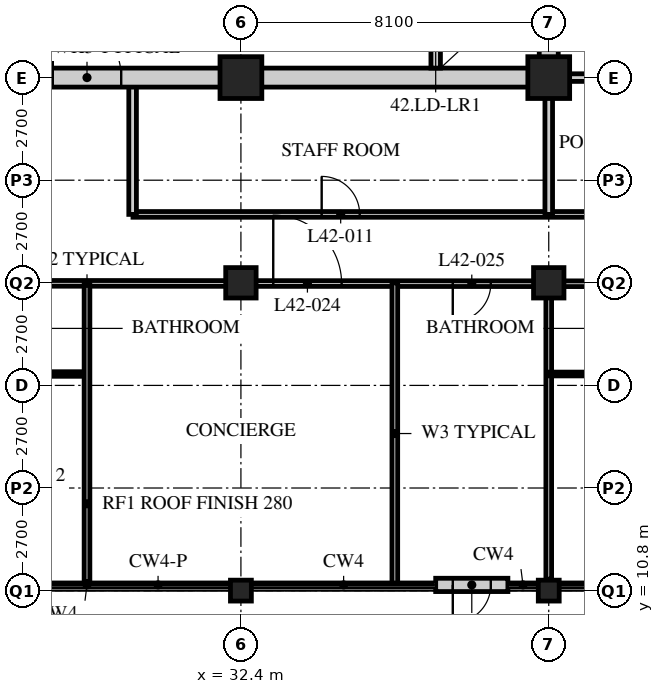
"""IFC4 building model, lengths in metres.
Left out: names, types, materials, properties, quantities, classifications, styles, units other than length and angle.
Written with IfcOpenShell. Run it as: python <this file> out.ifc"""

import sys

from ifc_helpers import new_model, si_unit, direction, frame, frame_2d, origin, origin_2d, place, context, subcontext, project, spatial, rectangle, hollow_rectangle, extrude, element, fill, save


model = new_model("IFC4")
c1 = context("Model", 3, precision=1e-05, world=origin(), true_north=direction((0.0, 1.0)))
c2 = subcontext(c1, "Body", "Model", "MODEL_VIEW")
j1 = project(units=[si_unit("LENGTHUNIT", "METRE"), si_unit("PLANEANGLEUNIT", "RADIAN")], contexts=[c1])
p1 = place(None, origin())
s1 = spatial("IfcSite", under=j1, at=p1, CompositionType="ELEMENT")
p2 = place(p1, origin())
s2 = spatial("IfcBuilding", under=s1, at=p2, CompositionType="ELEMENT")
p3 = place(p2, frame((0.0, 0.0, 165.0)))
s3 = spatial("IfcBuildingStorey", under=s2, at=p3, CompositionType="ELEMENT", Elevation=165.0)
p4 = place(p3, frame((32.4, 10.8, 0.0), z_axis=(0.0, 0.0, 1.0), x_axis=(1.0, 0.0, 0.0)))
e1 = element("IfcColumn", 1, at=p4, inside=s3, PredefinedType="COLUMN", context=c2, shape_type="SweptSolid", body=[
    extrude(hollow_rectangle(XDim=0.55, YDim=0.55, WallThickness=0.04, at=origin_2d()), origin(), (0.0, 0.0, 1.0), 5.4),
])
p5 = place(p3, frame((32.4, 18.9, 0.0), z_axis=(0.0, 0.0, 1.0), x_axis=(1.0, 0.0, 0.0)))
e2 = element("IfcColumn", 2, at=p5, inside=s3, PredefinedType="COLUMN", context=c2, shape_type="SweptSolid", body=[
    extrude(hollow_rectangle(XDim=0.8, YDim=0.8, WallThickness=0.08, at=origin_2d()), origin(), (0.0, 0.0, 1.0), 5.4),
])
p6 = place(p3, frame((32.4, 24.3, 0.0), z_axis=(0.0, 0.0, 1.0), x_axis=(1.0, 0.0, 0.0)))
e3 = element("IfcColumn", 3, at=p6, inside=s3, PredefinedType="COLUMN", context=c2, shape_type="SweptSolid", body=[
    extrude(hollow_rectangle(XDim=1.1, YDim=1.1, WallThickness=0.1, at=origin_2d()), origin(), (0.0, 0.0, 1.0), 5.4),
])
p7 = place(p3, frame((40.5, 10.8, 0.0), z_axis=(0.0, 0.0, 1.0), x_axis=(1.0, 0.0, 0.0)))
e4 = element("IfcColumn", 4, at=p7, inside=s3, PredefinedType="COLUMN", context=c2, shape_type="SweptSolid", body=[
    extrude(hollow_rectangle(XDim=0.55, YDim=0.55, WallThickness=0.04, at=origin_2d()), origin(), (0.0, 0.0, 1.0), 5.4),
])
p8 = place(p3, frame((40.5, 18.9, 0.0), z_axis=(0.0, 0.0, 1.0), x_axis=(1.0, 0.0, 0.0)))
e5 = element("IfcColumn", 5, at=p8, inside=s3, PredefinedType="COLUMN", context=c2, shape_type="SweptSolid", body=[
    extrude(hollow_rectangle(XDim=0.8, YDim=0.8, WallThickness=0.08, at=origin_2d()), origin(), (0.0, 0.0, 1.0), 5.4),
])
p9 = place(p3, frame((40.5, 24.3, 0.0), z_axis=(0.0, 0.0, 1.0), x_axis=(1.0, 0.0, 0.0)))
e6 = element("IfcColumn", 6, at=p9, inside=s3, PredefinedType="COLUMN", context=c2, shape_type="SweptSolid", body=[
    extrude(hollow_rectangle(XDim=1.1, YDim=1.1, WallThickness=0.1, at=origin_2d()), origin(), (0.0, 0.0, 1.0), 5.4),
])
p10 = place(p3, frame((37.525, 10.95, 0.0), z_axis=(0.0, 0.0, 1.0), x_axis=(1.0, 0.0, 0.0)))
e7 = element("IfcWall", 7, at=p10, inside=s3, PredefinedType="SOLIDWALL", context=c2, shape_type="SweptSolid", body=[
    extrude(rectangle(XDim=1.9, YDim=0.35, at=frame_2d((0.95, 0.0))), origin(), (0.0, 0.0, 1.0), 4.42),
])
p11 = place(p10, frame((0.45, 0.0, 0.0)))
e8 = element("IfcOpeningElement", 8, at=p11, cuts=e7, PredefinedType="OPENING", context=c2, shape_type="SweptSolid", body=[
    extrude(rectangle(XDim=1.0, YDim=2.1, at=frame_2d((0.5, 1.05))), frame((0.0, 0.185, 0.0), z_axis=(0.0, -1.0, 0.0), x_axis=(1.0, 0.0, 0.0)), (0.0, 0.0, 1.0), 0.37),
])
p12 = place(p3, frame((8.1, 18.9, 0.0), z_axis=(0.0, 0.0, 1.0), x_axis=(0.999999729567, -0.000735435758, 0.0)))
e9 = element("IfcWall", 9, at=p12, inside=s3, PredefinedType="PARTITIONING", context=c2, shape_type="SweptSolid", body=[
    extrude(rectangle(XDim=40.5, YDim=0.15, at=frame_2d((20.25, 0.0))), origin(), (0.0, 0.0, 1.0), 4.42),
])
p13 = place(p12, frame((4.45, 0.0, 0.0)))
e10 = element("IfcOpeningElement", 10, at=p13, cuts=e9, PredefinedType="OPENING", context=c2, shape_type="SweptSolid", body=[
    extrude(rectangle(XDim=1.0, YDim=2.1, at=frame_2d((0.5, 1.05))), frame((0.0, 0.085, 0.0), z_axis=(0.0, -1.0, 0.0), x_axis=(1.0, 0.0, 0.0)), (0.0, 0.0, 1.0), 0.17),
])
p14 = place(p12, frame((25.15, 0.0, 0.0)))
e11 = element("IfcOpeningElement", 11, at=p14, cuts=e9, PredefinedType="OPENING", context=c2, shape_type="SweptSolid", body=[
    extrude(rectangle(XDim=1.8, YDim=2.4, at=frame_2d((0.9, 1.2))), frame((0.0, 0.085, 0.0), z_axis=(0.0, -1.0, 0.0), x_axis=(1.0, 0.0, 0.0)), (0.0, 0.0, 1.0), 0.17),
])
p15 = place(p12, frame((29.875, 0.0, 0.0)))
e12 = element("IfcOpeningElement", 12, at=p15, cuts=e9, PredefinedType="OPENING", context=c2, shape_type="SweptSolid", body=[
    extrude(rectangle(XDim=1.0, YDim=2.1, at=frame_2d((0.5, 1.05))), frame((0.0, 0.085, 0.0), z_axis=(0.0, -1.0, 0.0), x_axis=(1.0, 0.0, 0.0)), (0.0, 0.0, 1.0), 0.17),
])
p16 = place(p12, frame((34.75, 0.0, 0.0)))
e13 = element("IfcOpeningElement", 13, at=p16, cuts=e9, PredefinedType="OPENING", context=c2, shape_type="SweptSolid", body=[
    extrude(rectangle(XDim=1.0, YDim=2.1, at=frame_2d((0.5, 1.05))), frame((0.0, 0.085, 0.0), z_axis=(0.0, -1.0, 0.0), x_axis=(1.0, 0.0, 0.0)), (0.0, 0.0, 1.0), 0.17),
])
p17 = place(p12, frame((1.525, 0.0, 0.0)))
e14 = element("IfcOpeningElement", 14, at=p17, cuts=e9, PredefinedType="OPENING", context=c2, shape_type="SweptSolid", body=[
    extrude(rectangle(XDim=1.0, YDim=2.1, at=frame_2d((0.5, 1.05))), frame((0.0, 0.085, 0.0), z_axis=(0.0, -1.0, 0.0), x_axis=(1.0, 0.0, 0.0)), (0.0, 0.0, 1.0), 0.17),
])
p18 = place(p12, frame((37.975, 0.0, 0.0)))
e15 = element("IfcOpeningElement", 15, at=p18, cuts=e9, PredefinedType="OPENING", context=c2, shape_type="SweptSolid", body=[
    extrude(rectangle(XDim=1.0, YDim=2.1, at=frame_2d((0.5, 1.05))), frame((0.0, 0.085, 0.0), z_axis=(0.0, -1.0, 0.0), x_axis=(1.0, 0.0, 0.0)), (0.0, 0.0, 1.0), 0.17),
])
p19 = place(p3, frame((29.56, 20.7, 0.0), z_axis=(0.0, 0.0, 1.0), x_axis=(1.0, 0.0, 0.0)))
e16 = element("IfcWall", 16, at=p19, inside=s3, PredefinedType="PARTITIONING", context=c2, shape_type="SweptSolid", body=[
    extrude(rectangle(XDim=17.24, YDim=0.15, at=frame_2d((8.62, 0.0))), origin(), (0.0, 0.0, 1.0), 5.19),
])
p20 = place(p19, frame((4.965, 0.0, 0.0)))
e17 = element("IfcOpeningElement", 17, at=p20, cuts=e16, PredefinedType="OPENING", context=c2, shape_type="SweptSolid", body=[
    extrude(rectangle(XDim=1.0, YDim=2.1, at=frame_2d((0.5, 1.05))), frame((0.0, 0.085, 0.0), z_axis=(0.0, -1.0, 0.0), x_axis=(1.0, 0.0, 0.0)), (0.0, 0.0, 1.0), 0.17),
])
p21 = place(p19, frame((13.59, 0.0, 0.0)))
e18 = element("IfcOpeningElement", 18, at=p21, cuts=e16, PredefinedType="OPENING", context=c2, shape_type="SweptSolid", body=[
    extrude(rectangle(XDim=1.0, YDim=2.1, at=frame_2d((0.5, 1.05))), frame((0.0, 0.085, 0.0), z_axis=(0.0, -1.0, 0.0), x_axis=(1.0, 0.0, 0.0)), (0.0, 0.0, 1.0), 0.17),
])
p22 = place(p3, frame((40.5, 20.7, 0.0), z_axis=(0.0, 0.0, 1.0), x_axis=(0.0, 1.0, 0.0)))
e19 = element("IfcWall", 19, at=p22, inside=s3, PredefinedType="SOLIDWALL", context=c2, shape_type="SweptSolid", body=[
    extrude(rectangle(XDim=3.6, YDim=0.2, at=frame_2d((1.8, 0.0))), origin(), (0.0, 0.0, 1.0), 4.42),
])
p23 = place(p3, frame((29.55, 20.7, 0.0), z_axis=(0.0, 0.0, 1.0), x_axis=(0.0, 1.0, 0.0)))
e20 = element("IfcWall", 20, at=p23, inside=s3, PredefinedType="SOLIDWALL", context=c2, shape_type="SweptSolid", body=[
    extrude(rectangle(XDim=3.6, YDim=0.2, at=frame_2d((1.8, 0.0))), origin(), (0.0, 0.0, 1.0), 5.19),
])
p24 = place(p3, frame((40.5, 24.3, 0.0), z_axis=(0.0, 0.0, 1.0), x_axis=(1.0, 0.0, 0.0)))
e21 = element("IfcWall", 21, at=p24, inside=s3, PredefinedType="SOLIDWALL", context=c2, shape_type="SweptSolid", body=[
    extrude(rectangle(XDim=6.3, YDim=0.2, at=frame_2d((3.15, 0.0))), origin(), (0.0, 0.0, 1.0), 5.19),
])
p25 = place(p3, frame((12.15, 16.5, 0.0), z_axis=(0.0, 0.0, 1.0), x_axis=(1.0, 0.0, 0.0)))
e22 = element("IfcWall", 22, at=p25, inside=s3, PredefinedType="PARTITIONING", context=c2, shape_type="SweptSolid", body=[
    extrude(rectangle(XDim=16.2, YDim=0.12, at=frame_2d((8.1, 0.0))), origin(), (0.0, 0.0, 1.0), 5.19),
])
p26 = place(p25, frame((0.975, 0.0, 0.0)))
e23 = element("IfcOpeningElement", 23, at=p26, cuts=e22, PredefinedType="OPENING", context=c2, shape_type="SweptSolid", body=[
    extrude(rectangle(XDim=0.85, YDim=2.1, at=frame_2d((0.425, 1.05))), frame((0.0, 0.07, 0.0), z_axis=(0.0, -1.0, 0.0), x_axis=(1.0, 0.0, 0.0)), (0.0, 0.0, 1.0), 0.14),
])
p27 = place(p25, frame((8.425, 0.0, 0.0)))
e24 = element("IfcOpeningElement", 24, at=p27, cuts=e22, PredefinedType="OPENING", context=c2, shape_type="SweptSolid", body=[
    extrude(rectangle(XDim=0.85, YDim=2.1, at=frame_2d((0.425, 1.05))), frame((0.0, 0.07, 0.0), z_axis=(0.0, -1.0, 0.0), x_axis=(1.0, 0.0, 0.0)), (0.0, 0.0, 1.0), 0.14),
])
p28 = place(p25, frame((12.475, 0.0, 0.0)))
e25 = element("IfcOpeningElement", 25, at=p28, cuts=e22, PredefinedType="OPENING", context=c2, shape_type="SweptSolid", body=[
    extrude(rectangle(XDim=0.85, YDim=2.1, at=frame_2d((0.425, 1.05))), frame((0.0, 0.07, 0.0), z_axis=(0.0, -1.0, 0.0), x_axis=(1.0, 0.0, 0.0)), (0.0, 0.0, 1.0), 0.14),
])
p29 = place(p3, frame((28.35, 18.9, 0.0), z_axis=(0.0, 0.0, 1.0), x_axis=(0.0, -1.0, 0.0)))
e26 = element("IfcWall", 26, at=p29, inside=s3, PredefinedType="PARTITIONING", context=c2, shape_type="SweptSolid", body=[
    extrude(rectangle(XDim=7.865, YDim=0.15, at=frame_2d((3.932, 0.0))), origin(), (0.0, 0.0, 1.0), 5.19),
])
p30 = place(p3, frame((36.45, 18.9, 0.0), z_axis=(0.0, 0.0, 1.0), x_axis=(0.0, -1.0, 0.0)))
e27 = element("IfcWall", 27, at=p30, inside=s3, PredefinedType="PARTITIONING", context=c2, shape_type="SweptSolid", body=[
    extrude(rectangle(XDim=7.933, YDim=0.15, at=frame_2d((3.966, 0.0))), origin(), (0.0, 0.0, 1.0), 5.19),
])
p31 = place(p3, frame((40.5, 18.9, 0.0), z_axis=(0.0, 0.0, 1.0), x_axis=(0.0, -1.0, 0.0)))
e28 = element("IfcWall", 28, at=p31, inside=s3, PredefinedType="PARTITIONING", context=c2, shape_type="SweptSolid", body=[
    extrude(rectangle(XDim=7.8, YDim=0.15, at=frame_2d((3.9, 0.0))), origin(), (0.0, 0.0, 1.0), 4.42),
])
p32 = place(p3, frame((40.5, 16.5, 0.0), z_axis=(0.0, 0.0, 1.0), x_axis=(1.0, 0.0, 0.0)))
e29 = element("IfcWall", 29, at=p32, inside=s3, PredefinedType="PARTITIONING", context=c2, shape_type="SweptSolid", body=[
    extrude(rectangle(XDim=2.2, YDim=0.1, at=frame_2d((1.1, 0.0))), origin(), (0.0, 0.0, 1.0), 5.19),
])
p33 = place(p3, frame((15.95, 24.3, 0.0), z_axis=(0.0, 0.0, 1.0), x_axis=(1.0, 0.0, 0.0)))
e30 = element("IfcWall", 30, at=p33, inside=s3, PredefinedType="SOLIDWALL", context=c2, shape_type="SweptSolid", body=[
    extrude(rectangle(XDim=24.8, YDim=0.5, at=frame_2d((12.4, 0.0))), origin(), (0.0, 0.0, 1.0), 4.42),
])
p34 = place(p33, frame((11.5, 0.0, 0.0)))
e31 = element("IfcOpeningElement", 31, at=p34, cuts=e30, PredefinedType="OPENING", context=c2, shape_type="SweptSolid", body=[
    extrude(rectangle(XDim=1.8, YDim=2.4, at=frame_2d((0.9, 1.2))), frame((0.0, 0.26, 0.0), z_axis=(0.0, -1.0, 0.0), x_axis=(1.0, 0.0, 0.0)), (0.0, 0.0, 1.0), 0.52),
])
p35 = place(p3, frame((40.5, 24.55, 0.0), z_axis=(0.0, 0.0, 1.0), x_axis=(0.0, 1.0, 0.0)))
e32 = element("IfcWall", 32, at=p35, inside=s3, PredefinedType="SOLIDWALL", context=c2, shape_type="SweptSolid", body=[
    extrude(rectangle(XDim=15.7, YDim=0.5, at=frame_2d((7.85, 0.0))), origin(), (0.0, 0.0, 1.0), 4.42),
])
p36 = place(p3, frame((37.525, 24.55, 0.0), z_axis=(0.0, 0.0, 1.0), x_axis=(0.0, 1.0, 0.0)))
e33 = element("IfcWall", 33, at=p36, inside=s3, PredefinedType="SOLIDWALL", context=c2, shape_type="SweptSolid", body=[
    extrude(rectangle(XDim=7.75, YDim=0.25, at=frame_2d((3.875, 0.0))), origin(), (0.0, 0.0, 1.0), 5.19),
])
p37 = place(p36, frame((0.65, 0.0, 0.0)))
e34 = element("IfcOpeningElement", 34, at=p37, cuts=e33, PredefinedType="OPENING", context=c2, shape_type="SweptSolid", body=[
    extrude(rectangle(XDim=1.1, YDim=2.4, at=frame_2d((0.55, 1.2))), frame((0.0, 0.135, 0.0), z_axis=(0.0, -1.0, 0.0), x_axis=(1.0, 0.0, 0.0)), (0.0, 0.0, 1.0), 0.27),
])
p38 = place(p36, frame((3.25, 0.0, 0.0)))
e35 = element("IfcOpeningElement", 35, at=p38, cuts=e33, PredefinedType="OPENING", context=c2, shape_type="SweptSolid", body=[
    extrude(rectangle(XDim=1.1, YDim=2.4, at=frame_2d((0.55, 1.2))), frame((0.0, 0.135, 0.0), z_axis=(0.0, -1.0, 0.0), x_axis=(1.0, 0.0, 0.0)), (0.0, 0.0, 1.0), 0.27),
])
p39 = place(p36, frame((5.85, 0.0, 0.0)))
e36 = element("IfcOpeningElement", 36, at=p39, cuts=e33, PredefinedType="OPENING", context=c2, shape_type="SweptSolid", body=[
    extrude(rectangle(XDim=1.1, YDim=2.4, at=frame_2d((0.55, 1.2))), frame((0.0, 0.135, 0.0), z_axis=(0.0, -1.0, 0.0), x_axis=(1.0, 0.0, 0.0)), (0.0, 0.0, 1.0), 0.27),
])
p40 = place(p11, origin())
e37 = element("IfcDoor", 37, at=p40, inside=s3, OperationType="SINGLE_SWING_RIGHT", PredefinedType="DOOR", context=c2, shape_type="SweptSolid", body=[
    extrude(rectangle(XDim=1.0, YDim=2.1, at=frame_2d((0.5, 1.05))), frame((0.0, 0.025, 0.0), z_axis=(0.0, -1.0, 0.0), x_axis=(1.0, 0.0, 0.0)), (0.0, 0.0, 1.0), 0.05),
])
fill(e8, e37)
p41 = place(p20, origin())
e38 = element("IfcDoor", 38, at=p41, inside=s3, OperationType="SINGLE_SWING_LEFT", PredefinedType="DOOR", context=c2, shape_type="SweptSolid", body=[
    extrude(rectangle(XDim=1.0, YDim=2.1, at=frame_2d((0.5, 1.05))), frame((0.0, 0.025, 0.0), z_axis=(0.0, -1.0, 0.0), x_axis=(1.0, 0.0, 0.0)), (0.0, 0.0, 1.0), 0.05),
])
fill(e17, e38)
p42 = place(p14, origin())
e39 = element("IfcDoor", 39, at=p42, inside=s3, OperationType="DOUBLE_DOOR_SINGLE_SWING", PredefinedType="DOOR", context=c2, shape_type="SweptSolid", body=[
    extrude(rectangle(XDim=1.8, YDim=2.4, at=frame_2d((0.9, 1.2))), frame((0.0, 0.025, 0.0), z_axis=(0.0, -1.0, 0.0), x_axis=(1.0, 0.0, 0.0)), (0.0, 0.0, 1.0), 0.05),
])
fill(e11, e39)
p43 = place(p15, origin())
e40 = element("IfcDoor", 40, at=p43, inside=s3, OperationType="SINGLE_SWING_RIGHT", PredefinedType="DOOR", context=c2, shape_type="SweptSolid", body=[
    extrude(rectangle(XDim=1.0, YDim=2.1, at=frame_2d((0.5, 1.05))), frame((0.0, 0.025, 0.0), z_axis=(0.0, -1.0, 0.0), x_axis=(1.0, 0.0, 0.0)), (0.0, 0.0, 1.0), 0.05),
])
fill(e12, e40)
p44 = place(p34, origin())
e41 = element("IfcDoor", 41, at=p44, inside=s3, OperationType="DOUBLE_DOOR_SINGLE_SWING", PredefinedType="DOOR", context=c2, shape_type="SweptSolid", body=[
    extrude(rectangle(XDim=1.8, YDim=2.4, at=frame_2d((0.9, 1.2))), frame((0.0, 0.025, 0.0), z_axis=(0.0, -1.0, 0.0), x_axis=(1.0, 0.0, 0.0)), (0.0, 0.0, 1.0), 0.05),
])
fill(e31, e41)
save(model, sys.argv[1])
